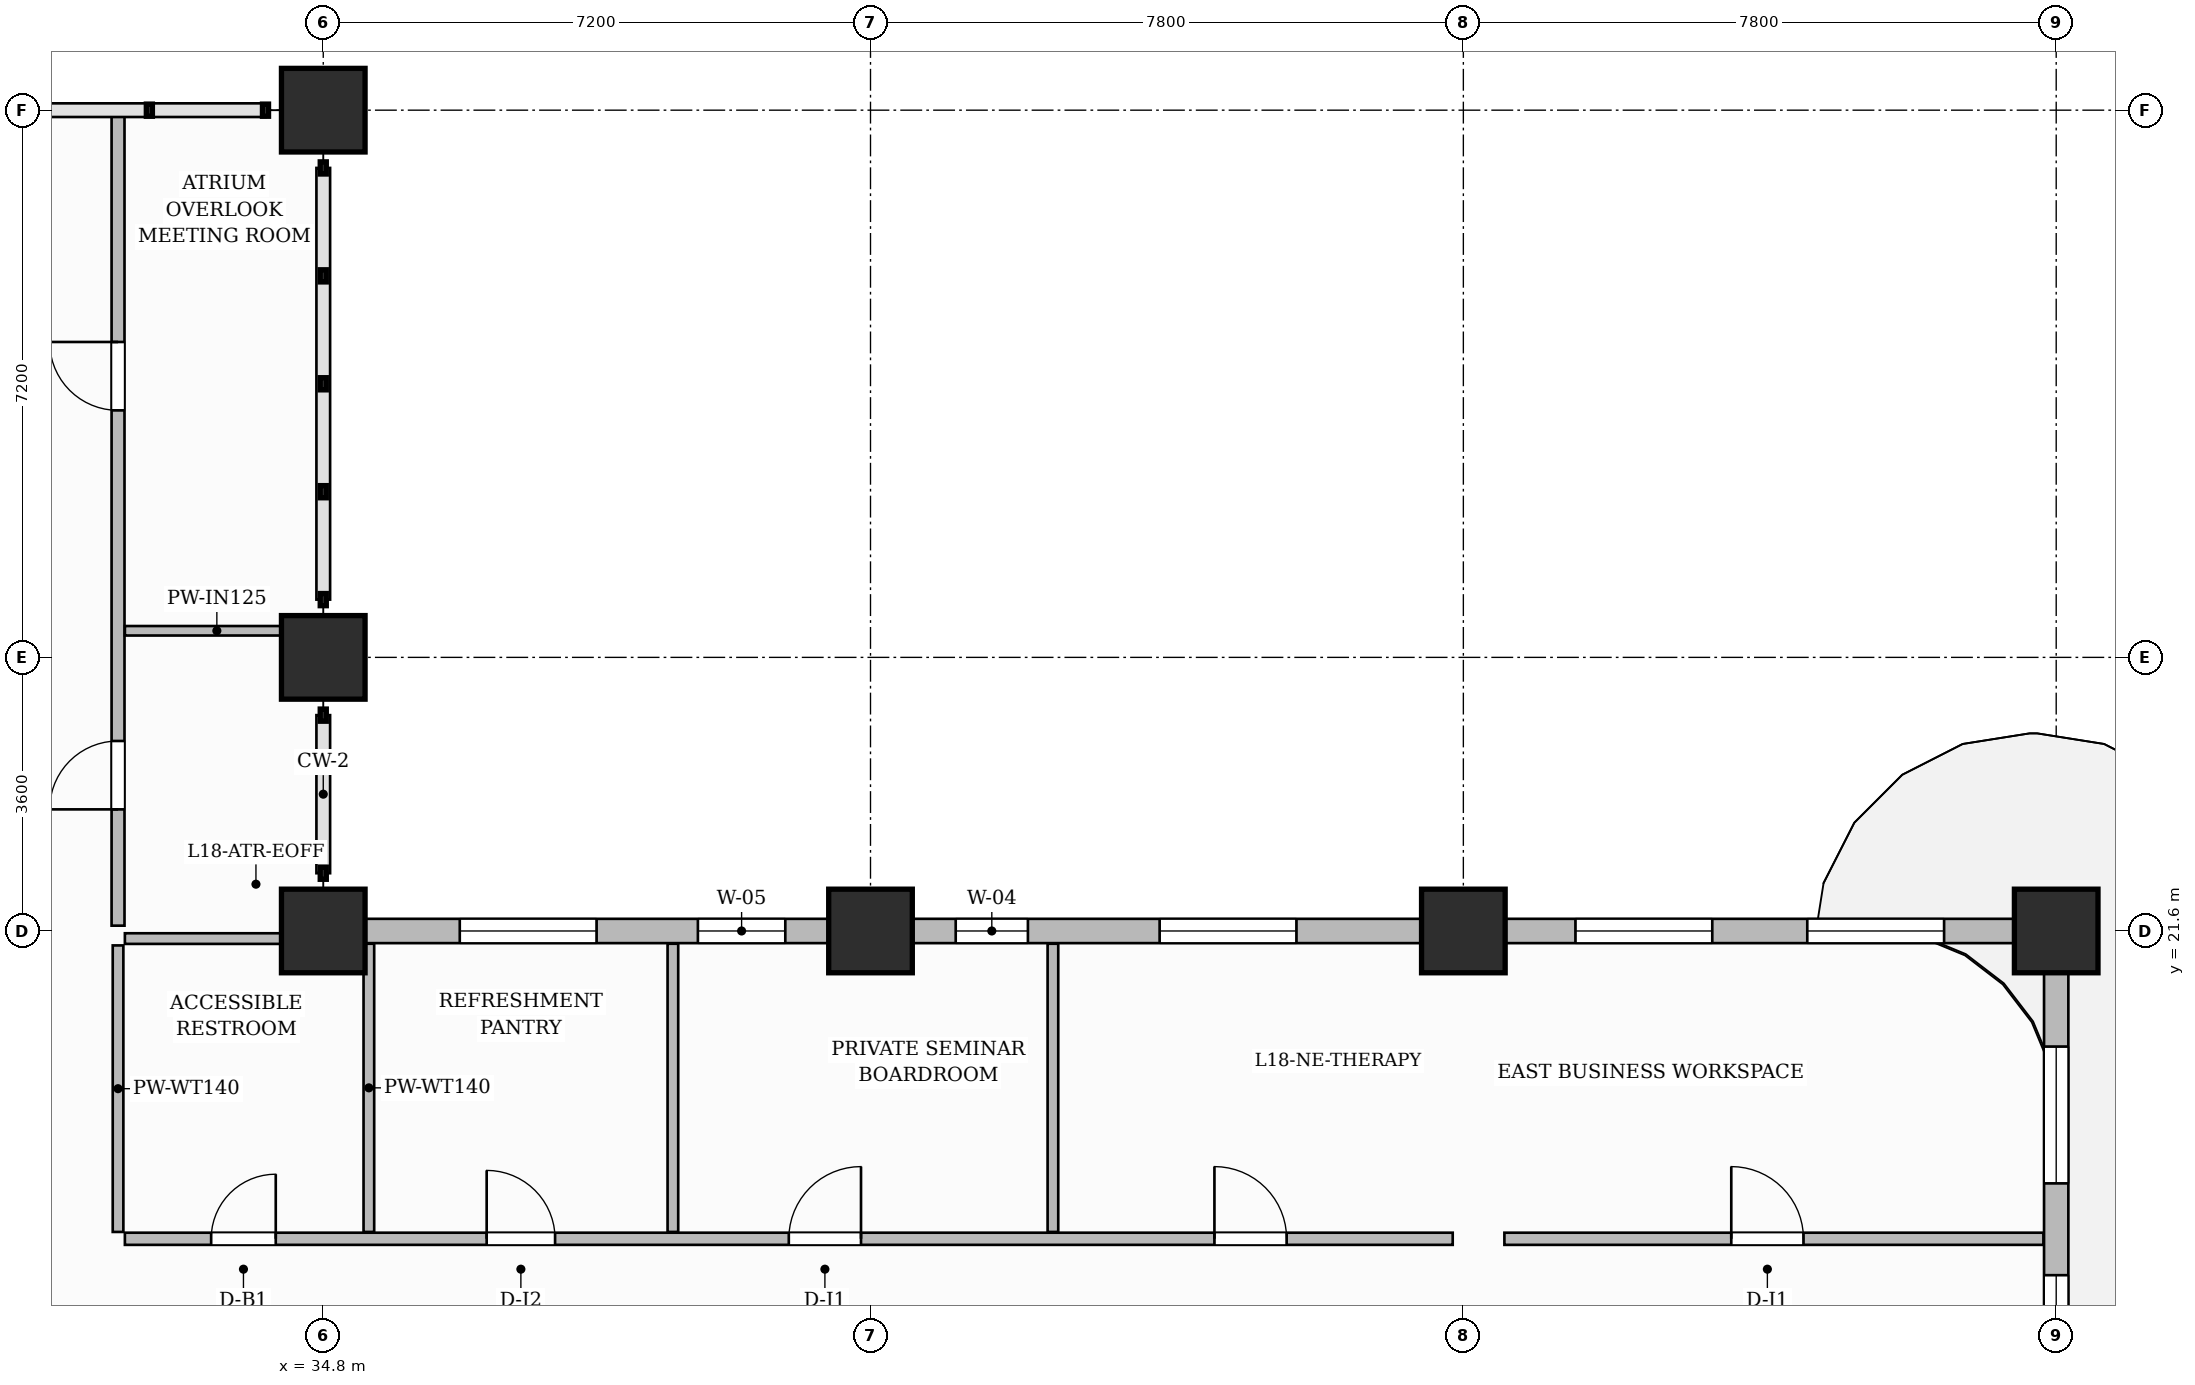
"""IFC4 building model, lengths in metres.
Left out: names, types, materials, properties, quantities, classifications, styles, units other than length and angle.
Written with IfcOpenShell. Run it as: python <this file> out.ifc"""

import sys

from ifc_helpers import new_model, si_unit, direction, frame, frame_2d, origin, origin_2d, place, context, subcontext, project, spatial, rectangle, extrude, source, transform, mapped, element, fill, save


model = new_model("IFC4")
c1 = context("Model", 3, precision=1e-05, world=origin(), true_north=direction((0.0, 1.0)))
c2 = subcontext(c1, "Body", "Model", "MODEL_VIEW")
j1 = project(units=[si_unit("LENGTHUNIT", "METRE"), si_unit("PLANEANGLEUNIT", "RADIAN")], contexts=[c1])
p1 = place(None, origin())
s1 = spatial("IfcSite", under=j1, at=p1, CompositionType="ELEMENT")
p2 = place(p1, origin())
s2 = spatial("IfcBuilding", under=s1, at=p2, CompositionType="ELEMENT")
p3 = place(p2, frame((0.0, 0.0, 76.8)))
s3 = spatial("IfcBuildingStorey", under=s2, at=p3, CompositionType="ELEMENT", Elevation=76.8)
m1 = source(origin(), c2, "Body", "SweptSolid", [
    extrude(rectangle(XDim=1.1, YDim=1.1, at=origin_2d()), origin(), (0.0, 0.0, 1.0), 3.7),
])
for number, where, z_axis, x_axis in (
    (1, (34.8, 21.6, 0.0), (0.0, 0.0, 1.0), (1.0, 0.0, 0.0)),
    (2, (34.8, 25.2, 0.0), (0.0, 0.0, 1.0), (1.0, 0.0, 0.0)),
    (3, (34.8, 32.4, 0.0), (0.0, 0.0, 1.0), (1.0, 0.0, 0.0)),
    (4, (42.0, 21.6, 0.0), (0.0, 0.0, 1.0), (1.0, 0.0, 0.0)),
    (5, (49.8, 21.6, 0.0), (0.0, 0.0, 1.0), (1.0, 0.0, 0.0)),
    (6, (57.6, 21.6, 0.0), (0.0, 0.0, 1.0), (1.0, 0.0, 0.0)),
):
    element("IfcColumn", number, at=place(p3, frame(where, z_axis=z_axis, x_axis=x_axis)), inside=s3, PredefinedType="COLUMN", context=c2, shape_type="MappedRepresentation", body=[
        mapped(m1, transform((0.0, 0.0, 0.0), scale=1.0)),
    ])
p4 = place(p3, frame((32.19, 17.55, 0.0), z_axis=(0.0, 0.0, 1.0), x_axis=(1.0, 0.0, 0.0)))
e7 = element("IfcWall", 7, at=p4, inside=s3, PredefinedType="PARTITIONING", context=c2, shape_type="SweptSolid", body=[
    extrude(rectangle(XDim=17.47, YDim=0.16, at=frame_2d((8.735, 0.0))), origin(), (0.0, 0.0, 1.0), 3.45),
])
p5 = place(p4, frame((1.135, 0.0, 0.0)))
e8 = element("IfcOpeningElement", 8, at=p5, cuts=e7, PredefinedType="OPENING", context=c2, shape_type="SweptSolid", body=[
    extrude(rectangle(XDim=0.85, YDim=2.1, at=frame_2d((0.425, 1.05))), frame((0.0, 0.09, 0.0), z_axis=(0.0, -1.0, 0.0), x_axis=(1.0, 0.0, 0.0)), (0.0, 0.0, 1.0), 0.18),
])
p6 = place(p4, frame((4.76, 0.0, 0.0)))
e9 = element("IfcOpeningElement", 9, at=p6, cuts=e7, PredefinedType="OPENING", context=c2, shape_type="SweptSolid", body=[
    extrude(rectangle(XDim=0.9, YDim=2.15, at=frame_2d((0.45, 1.075))), frame((0.0, 0.09, 0.0), z_axis=(0.0, -1.0, 0.0), x_axis=(1.0, 0.0, 0.0)), (0.0, 0.0, 1.0), 0.18),
])
p7 = place(p4, frame((8.735, 0.0, 0.0)))
e10 = element("IfcOpeningElement", 10, at=p7, cuts=e7, PredefinedType="OPENING", context=c2, shape_type="SweptSolid", body=[
    extrude(rectangle(XDim=0.95, YDim=2.15, at=frame_2d((0.475, 1.075))), frame((0.0, 0.09, 0.0), z_axis=(0.0, -1.0, 0.0), x_axis=(1.0, 0.0, 0.0)), (0.0, 0.0, 1.0), 0.18),
])
p8 = place(p4, frame((14.335, 0.0, 0.0)))
e11 = element("IfcOpeningElement", 11, at=p8, cuts=e7, PredefinedType="OPENING", context=c2, shape_type="SweptSolid", body=[
    extrude(rectangle(XDim=0.95, YDim=2.15, at=frame_2d((0.475, 1.075))), frame((0.0, 0.09, 0.0), z_axis=(0.0, -1.0, 0.0), x_axis=(1.0, 0.0, 0.0)), (0.0, 0.0, 1.0), 0.18),
])
p9 = place(p3, frame((50.34, 17.55, 0.0), z_axis=(0.0, 0.0, 1.0), x_axis=(1.0, 0.0, 0.0)))
e12 = element("IfcWall", 12, at=p9, inside=s3, PredefinedType="PARTITIONING", context=c2, shape_type="SweptSolid", body=[
    extrude(rectangle(XDim=7.092, YDim=0.16, at=frame_2d((3.546, 0.0))), origin(), (0.0, 0.0, 1.0), 3.45),
])
p10 = place(p9, frame((2.985, 0.0, 0.0)))
e13 = element("IfcOpeningElement", 13, at=p10, cuts=e12, PredefinedType="OPENING", context=c2, shape_type="SweptSolid", body=[
    extrude(rectangle(XDim=0.95, YDim=2.15, at=frame_2d((0.475, 1.075))), frame((0.0, 0.09, 0.0), z_axis=(0.0, -1.0, 0.0), x_axis=(1.0, 0.0, 0.0)), (0.0, 0.0, 1.0), 0.18),
])
p11 = place(p3, frame((32.1, 17.64, 0.0), z_axis=(0.0, 0.0, 1.0), x_axis=(0.0, 1.0, 0.0)))
e14 = element("IfcWall", 14, at=p11, inside=s3, PredefinedType="PARTITIONING", context=c2, shape_type="SweptSolid", body=[
    extrude(rectangle(XDim=3.77, YDim=0.14, at=frame_2d((1.885, 0.0))), origin(), (0.0, 0.0, 1.0), 3.45),
])
for number, where, z_axis, x_axis in (
    (15, (35.4, 17.64, 0.0), (0.0, 0.0, 1.0), (0.0, 1.0, 0.0)),
    (16, (39.4, 17.64, 0.0), (0.0, 0.0, 1.0), (0.0, 1.0, 0.0)),
    (17, (44.4, 17.64, 0.0), (0.0, 0.0, 1.0), (0.0, 1.0, 0.0)),
):
    element("IfcWall", number, at=place(p3, frame(where, z_axis=z_axis, x_axis=x_axis)), inside=s3, PredefinedType="PARTITIONING", context=c2, shape_type="SweptSolid", body=[
        extrude(rectangle(XDim=3.792, YDim=0.14, at=frame_2d((1.896, 0.0))), origin(), (0.0, 0.0, 1.0), 3.45),
    ])
p12 = place(p3, frame((32.19, 21.5, 0.0), z_axis=(0.0, 0.0, 1.0), x_axis=(1.0, 0.0, 0.0)))
e18 = element("IfcWall", 18, at=p12, inside=s3, PredefinedType="PARTITIONING", context=c2, shape_type="SweptSolid", body=[
    extrude(rectangle(XDim=2.42, YDim=0.14, at=frame_2d((1.21, 0.0))), origin(), (0.0, 0.0, 1.0), 2.885),
])
p13 = place(p3, frame((32.1, 21.67, 0.0), z_axis=(0.0, 0.0, 1.0), x_axis=(0.0, 1.0, 0.0)))
e19 = element("IfcWall", 19, at=p13, inside=s3, PredefinedType="PARTITIONING", context=c2, shape_type="SweptSolid", body=[
    extrude(rectangle(XDim=10.702, YDim=0.17, at=frame_2d((5.351, 0.0))), origin(), (0.0, 0.0, 1.0), 3.45),
])
p14 = place(p13, frame((1.53, 0.0, 0.0)))
e20 = element("IfcOpeningElement", 20, at=p14, cuts=e19, PredefinedType="OPENING", context=c2, shape_type="SweptSolid", body=[
    extrude(rectangle(XDim=0.9, YDim=2.15, at=frame_2d((0.45, 1.075))), frame((0.0, 0.095, 0.0), z_axis=(0.0, -1.0, 0.0), x_axis=(1.0, 0.0, 0.0)), (0.0, 0.0, 1.0), 0.19),
])
p15 = place(p13, frame((6.78, 0.0, 0.0)))
e21 = element("IfcOpeningElement", 21, at=p15, cuts=e19, PredefinedType="OPENING", context=c2, shape_type="SweptSolid", body=[
    extrude(rectangle(XDim=0.9, YDim=2.15, at=frame_2d((0.45, 1.075))), frame((0.0, 0.095, 0.0), z_axis=(0.0, -1.0, 0.0), x_axis=(1.0, 0.0, 0.0)), (0.0, 0.0, 1.0), 0.19),
])
p16 = place(p3, frame((32.19, 25.55, 0.0), z_axis=(0.0, 0.0, 1.0), x_axis=(1.0, 0.0, 0.0)))
e22 = element("IfcWall", 22, at=p16, inside=s3, PredefinedType="PARTITIONING", context=c2, shape_type="SweptSolid", body=[
    extrude(rectangle(XDim=2.42, YDim=0.125, at=frame_2d((1.21, 0.0))), origin(), (0.0, 0.0, 1.0), 3.45),
])
p17 = place(p3, frame((57.6, 0.05, 0.0), z_axis=(0.0, 0.0, 1.0), x_axis=(0.0, 1.0, 0.0)))
e23 = element("IfcWall", 23, at=p17, inside=s3, PredefinedType="SOLIDWALL", context=c2, shape_type="SweptSolid", body=[
    extrude(rectangle(XDim=21.5, YDim=0.32, at=frame_2d((10.75, 0.0))), origin(), (0.0, 0.0, 1.0), 2.885),
])
p18 = place(p17, frame((3.072, 0.0, 0.0)))
e24 = element("IfcOpeningElement", 24, at=p18, cuts=e23, PredefinedType="OPENING", context=c2, shape_type="SweptSolid", body=[
    extrude(rectangle(XDim=1.2, YDim=2.2, at=frame_2d((0.6, 1.1))), frame((0.0, 0.17, 0.0), z_axis=(0.0, -1.0, 0.0), x_axis=(1.0, 0.0, 0.0)), (0.0, 0.0, 1.0), 0.34),
])
p19 = place(p17, frame((1.061, 0.0, 0.8)))
e25 = element("IfcOpeningElement", 25, at=p19, cuts=e23, PredefinedType="OPENING", context=c2, shape_type="SweptSolid", body=[
    extrude(rectangle(XDim=1.4, YDim=1.85, at=frame_2d((0.7, 0.925))), frame((0.0, 0.17, 0.0), z_axis=(0.0, -1.0, 0.0), x_axis=(1.0, 0.0, 0.0)), (0.0, 0.0, 1.0), 0.34),
])
p20 = place(p17, frame((4.886, 0.0, 0.8)))
e26 = element("IfcOpeningElement", 26, at=p20, cuts=e23, PredefinedType="OPENING", context=c2, shape_type="SweptSolid", body=[
    extrude(rectangle(XDim=1.15, YDim=1.8, at=frame_2d((0.575, 0.9))), frame((0.0, 0.17, 0.0), z_axis=(0.0, -1.0, 0.0), x_axis=(1.0, 0.0, 0.0)), (0.0, 0.0, 1.0), 0.34),
])
p21 = place(p17, frame((10.454, 0.0, 0.8)))
e27 = element("IfcOpeningElement", 27, at=p21, cuts=e23, PredefinedType="OPENING", context=c2, shape_type="SweptSolid", body=[
    extrude(rectangle(XDim=1.8, YDim=1.85, at=frame_2d((0.9, 0.925))), frame((0.0, 0.17, 0.0), z_axis=(0.0, -1.0, 0.0), x_axis=(1.0, 0.0, 0.0)), (0.0, 0.0, 1.0), 0.34),
])
p22 = place(p17, frame((15.621, 0.0, 0.8)))
e28 = element("IfcOpeningElement", 28, at=p22, cuts=e23, PredefinedType="OPENING", context=c2, shape_type="SweptSolid", body=[
    extrude(rectangle(XDim=1.4, YDim=1.85, at=frame_2d((0.7, 0.925))), frame((0.0, 0.17, 0.0), z_axis=(0.0, -1.0, 0.0), x_axis=(1.0, 0.0, 0.0)), (0.0, 0.0, 1.0), 0.34),
])
p23 = place(p17, frame((18.229, 0.0, 0.8)))
e29 = element("IfcOpeningElement", 29, at=p23, cuts=e23, PredefinedType="OPENING", context=c2, shape_type="SweptSolid", body=[
    extrude(rectangle(XDim=1.8, YDim=1.85, at=frame_2d((0.9, 0.925))), frame((0.0, 0.17, 0.0), z_axis=(0.0, -1.0, 0.0), x_axis=(1.0, 0.0, 0.0)), (0.0, 0.0, 1.0), 0.34),
])
p24 = place(p3, frame((34.8, 21.6, 0.0), z_axis=(0.0, 0.0, 1.0), x_axis=(1.0, 0.0, 0.0)))
e30 = element("IfcWall", 30, at=p24, inside=s3, PredefinedType="SOLIDWALL", context=c2, shape_type="SweptSolid", body=[
    extrude(rectangle(XDim=22.8, YDim=0.32, at=frame_2d((11.4, 0.0))), origin(), (0.0, 0.0, 1.0), 2.885),
])
p25 = place(p24, frame((1.796, 0.0, 0.8)))
e31 = element("IfcOpeningElement", 31, at=p25, cuts=e30, PredefinedType="OPENING", context=c2, shape_type="SweptSolid", body=[
    extrude(rectangle(XDim=1.8, YDim=1.85, at=frame_2d((0.9, 0.925))), frame((0.0, 0.17, 0.0), z_axis=(0.0, -1.0, 0.0), x_axis=(1.0, 0.0, 0.0)), (0.0, 0.0, 1.0), 0.34),
])
p26 = place(p24, frame((4.929, 0.0, 0.8)))
e32 = element("IfcOpeningElement", 32, at=p26, cuts=e30, PredefinedType="OPENING", context=c2, shape_type="SweptSolid", body=[
    extrude(rectangle(XDim=1.15, YDim=1.8, at=frame_2d((0.575, 0.9))), frame((0.0, 0.17, 0.0), z_axis=(0.0, -1.0, 0.0), x_axis=(1.0, 0.0, 0.0)), (0.0, 0.0, 1.0), 0.34),
])
p27 = place(p24, frame((8.321, 0.0, 0.8)))
e33 = element("IfcOpeningElement", 33, at=p27, cuts=e30, PredefinedType="OPENING", context=c2, shape_type="SweptSolid", body=[
    extrude(rectangle(XDim=0.95, YDim=1.75, at=frame_2d((0.475, 0.875))), frame((0.0, 0.17, 0.0), z_axis=(0.0, -1.0, 0.0), x_axis=(1.0, 0.0, 0.0)), (0.0, 0.0, 1.0), 0.34),
])
p28 = place(p24, frame((11.004, 0.0, 0.8)))
e34 = element("IfcOpeningElement", 34, at=p28, cuts=e30, PredefinedType="OPENING", context=c2, shape_type="SweptSolid", body=[
    extrude(rectangle(XDim=1.8, YDim=1.85, at=frame_2d((0.9, 0.925))), frame((0.0, 0.17, 0.0), z_axis=(0.0, -1.0, 0.0), x_axis=(1.0, 0.0, 0.0)), (0.0, 0.0, 1.0), 0.34),
])
p29 = place(p24, frame((16.475, 0.0, 0.8)))
e35 = element("IfcOpeningElement", 35, at=p29, cuts=e30, PredefinedType="OPENING", context=c2, shape_type="SweptSolid", body=[
    extrude(rectangle(XDim=1.8, YDim=1.85, at=frame_2d((0.9, 0.925))), frame((0.0, 0.17, 0.0), z_axis=(0.0, -1.0, 0.0), x_axis=(1.0, 0.0, 0.0)), (0.0, 0.0, 1.0), 0.34),
])
p30 = place(p24, frame((19.525, 0.0, 0.8)))
e36 = element("IfcOpeningElement", 36, at=p30, cuts=e30, PredefinedType="OPENING", context=c2, shape_type="SweptSolid", body=[
    extrude(rectangle(XDim=1.8, YDim=1.85, at=frame_2d((0.9, 0.925))), frame((0.0, 0.17, 0.0), z_axis=(0.0, -1.0, 0.0), x_axis=(1.0, 0.0, 0.0)), (0.0, 0.0, 1.0), 0.34),
])
m2 = source(origin(), c2, "Body", "SweptSolid", [
    extrude(rectangle(XDim=0.95, YDim=2.15, at=frame_2d((0.475, 1.075))), frame((0.0, 0.025, 0.0), z_axis=(0.0, -1.0, 0.0), x_axis=(1.0, 0.0, 0.0)), (0.0, 0.0, 1.0), 0.05),
])
p31 = place(p10, origin())
e37 = element("IfcDoor", 37, at=p31, inside=s3, OperationType="SINGLE_SWING_LEFT", PredefinedType="DOOR", context=c2, shape_type="MappedRepresentation", body=[
    mapped(m2, transform((0.0, 0.0, 0.0), scale=1.0)),
])
fill(e13, e37)
m3 = source(origin(), c2, "Body", "SweptSolid", [
    extrude(rectangle(XDim=0.85, YDim=2.1, at=frame_2d((0.425, 1.05))), frame((0.0, 0.025, 0.0), z_axis=(0.0, -1.0, 0.0), x_axis=(1.0, 0.0, 0.0)), (0.0, 0.0, 1.0), 0.05),
])
p32 = place(p5, origin())
e38 = element("IfcDoor", 38, at=p32, inside=s3, OperationType="SINGLE_SWING_RIGHT", PredefinedType="DOOR", context=c2, shape_type="MappedRepresentation", body=[
    mapped(m3, transform((0.0, 0.0, 0.0), scale=1.0)),
])
fill(e8, e38)
m4 = source(origin(), c2, "Body", "SweptSolid", [
    extrude(rectangle(XDim=0.9, YDim=2.15, at=frame_2d((0.45, 1.075))), frame((0.0, 0.025, 0.0), z_axis=(0.0, -1.0, 0.0), x_axis=(1.0, 0.0, 0.0)), (0.0, 0.0, 1.0), 0.05),
])
p33 = place(p6, origin())
e39 = element("IfcDoor", 39, at=p33, inside=s3, OperationType="SINGLE_SWING_LEFT", PredefinedType="DOOR", context=c2, shape_type="MappedRepresentation", body=[
    mapped(m4, transform((0.0, 0.0, 0.0), scale=1.0)),
])
fill(e9, e39)
p34 = place(p7, origin())
e40 = element("IfcDoor", 40, at=p34, inside=s3, OperationType="SINGLE_SWING_RIGHT", PredefinedType="DOOR", context=c2, shape_type="MappedRepresentation", body=[
    mapped(m2, transform((0.0, 0.0, 0.0), scale=1.0)),
])
fill(e10, e40)
p35 = place(p8, origin())
e41 = element("IfcDoor", 41, at=p35, inside=s3, OperationType="SINGLE_SWING_LEFT", PredefinedType="DOOR", context=c2, shape_type="MappedRepresentation", body=[
    mapped(m2, transform((0.0, 0.0, 0.0), scale=1.0)),
])
fill(e11, e41)
p36 = place(p14, origin())
e42 = element("IfcDoor", 42, at=p36, inside=s3, OperationType="SINGLE_SWING_LEFT", PredefinedType="DOOR", context=c2, shape_type="MappedRepresentation", body=[
    mapped(m4, transform((0.0, 0.0, 0.0), scale=1.0)),
])
fill(e20, e42)
p37 = place(p15, origin())
e43 = element("IfcDoor", 43, at=p37, inside=s3, OperationType="SINGLE_SWING_RIGHT", PredefinedType="DOOR", context=c2, shape_type="MappedRepresentation", body=[
    mapped(m4, transform((0.0, 0.0, 0.0), scale=1.0)),
])
fill(e21, e43)
m5 = source(origin(), c2, "Body", "SweptSolid", [
    extrude(rectangle(XDim=1.4, YDim=1.85, at=frame_2d((0.7, 0.925))), frame((0.0, 0.03, 0.0), z_axis=(0.0, -1.0, 0.0), x_axis=(1.0, 0.0, 0.0)), (0.0, 0.0, 1.0), 0.06),
])
p38 = place(p22, origin())
e44 = element("IfcWindow", 44, at=p38, inside=s3, PartitioningType="SINGLE_PANEL", PredefinedType="WINDOW", context=c2, shape_type="MappedRepresentation", body=[
    mapped(m5, transform((0.0, 0.0, 0.0), scale=1.0)),
])
fill(e28, e44)
m6 = source(origin(), c2, "Body", "SweptSolid", [
    extrude(rectangle(XDim=1.8, YDim=1.85, at=frame_2d((0.9, 0.925))), frame((0.0, 0.03, 0.0), z_axis=(0.0, -1.0, 0.0), x_axis=(1.0, 0.0, 0.0)), (0.0, 0.0, 1.0), 0.06),
])
p39 = place(p23, origin())
e45 = element("IfcWindow", 45, at=p39, inside=s3, PartitioningType="DOUBLE_PANEL_VERTICAL", PredefinedType="WINDOW", context=c2, shape_type="MappedRepresentation", body=[
    mapped(m6, transform((0.0, 0.0, 0.0), scale=1.0)),
])
fill(e29, e45)
p40 = place(p25, origin())
e46 = element("IfcWindow", 46, at=p40, inside=s3, PartitioningType="DOUBLE_PANEL_VERTICAL", PredefinedType="WINDOW", context=c2, shape_type="MappedRepresentation", body=[
    mapped(m6, transform((0.0, 0.0, 0.0), scale=1.0)),
])
fill(e31, e46)
m7 = source(origin(), c2, "Body", "SweptSolid", [
    extrude(rectangle(XDim=1.15, YDim=1.8, at=frame_2d((0.575, 0.9))), frame((0.0, 0.03, 0.0), z_axis=(0.0, -1.0, 0.0), x_axis=(1.0, 0.0, 0.0)), (0.0, 0.0, 1.0), 0.06),
])
p41 = place(p26, origin())
e47 = element("IfcWindow", 47, at=p41, inside=s3, PartitioningType="SINGLE_PANEL", PredefinedType="WINDOW", context=c2, shape_type="MappedRepresentation", body=[
    mapped(m7, transform((0.0, 0.0, 0.0), scale=1.0)),
])
fill(e32, e47)
m8 = source(origin(), c2, "Body", "SweptSolid", [
    extrude(rectangle(XDim=0.95, YDim=1.75, at=frame_2d((0.475, 0.875))), frame((0.0, 0.03, 0.0), z_axis=(0.0, -1.0, 0.0), x_axis=(1.0, 0.0, 0.0)), (0.0, 0.0, 1.0), 0.06),
])
p42 = place(p27, origin())
e48 = element("IfcWindow", 48, at=p42, inside=s3, PartitioningType="SINGLE_PANEL", PredefinedType="WINDOW", context=c2, shape_type="MappedRepresentation", body=[
    mapped(m8, transform((0.0, 0.0, 0.0), scale=1.0)),
])
fill(e33, e48)
p43 = place(p28, origin())
e49 = element("IfcWindow", 49, at=p43, inside=s3, PartitioningType="DOUBLE_PANEL_VERTICAL", PredefinedType="WINDOW", context=c2, shape_type="MappedRepresentation", body=[
    mapped(m6, transform((0.0, 0.0, 0.0), scale=1.0)),
])
fill(e34, e49)
p44 = place(p29, origin())
e50 = element("IfcWindow", 50, at=p44, inside=s3, PartitioningType="DOUBLE_PANEL_VERTICAL", PredefinedType="WINDOW", context=c2, shape_type="MappedRepresentation", body=[
    mapped(m6, transform((0.0, 0.0, 0.0), scale=1.0)),
])
fill(e35, e50)
p45 = place(p30, origin())
e51 = element("IfcWindow", 51, at=p45, inside=s3, PartitioningType="DOUBLE_PANEL_VERTICAL", PredefinedType="WINDOW", context=c2, shape_type="MappedRepresentation", body=[
    mapped(m6, transform((0.0, 0.0, 0.0), scale=1.0)),
])
fill(e36, e51)
save(model, sys.argv[1])
